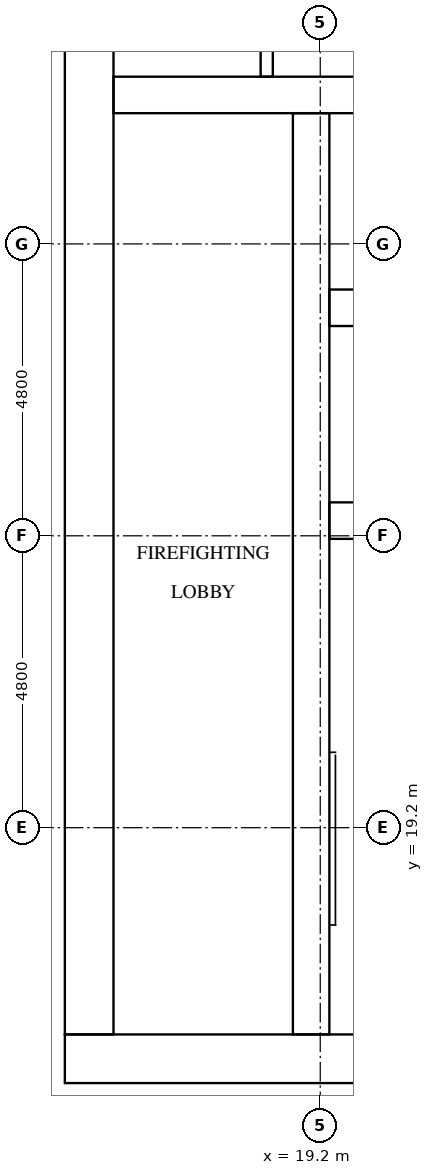
"""IFC4 building model, lengths in metres.
Left out: names, types, materials, properties, quantities, classifications, styles, units other than length and angle.
Written with IfcOpenShell. Run it as: python <this file> out.ifc"""

import sys

from ifc_helpers import new_model, si_unit, direction, frame, frame_2d, origin, place, context, subcontext, project, spatial, rectangle, extrude, element, fill, save


model = new_model("IFC4")
c1 = context("Model", 3, precision=1e-05, world=origin(), true_north=direction((0.0, 1.0)))
c2 = subcontext(c1, "Body", "Model", "MODEL_VIEW")
j1 = project(units=[si_unit("LENGTHUNIT", "METRE"), si_unit("PLANEANGLEUNIT", "RADIAN")], contexts=[c1])
p1 = place(None, origin())
s1 = spatial("IfcSite", under=j1, at=p1, CompositionType="ELEMENT")
p2 = place(p1, origin())
s2 = spatial("IfcBuilding", under=s1, at=p2, CompositionType="ELEMENT")
p3 = place(p2, frame((0.0, 0.0, 133.1)))
s3 = spatial("IfcBuildingStorey", under=s2, at=p3, CompositionType="ELEMENT", Elevation=133.1)
p4 = place(p3, frame((15.0, 15.4, 0.0), z_axis=(0.0, 0.0, 1.0), x_axis=(1.0, 0.0, 0.0)))
e1 = element("IfcWall", 1, at=p4, inside=s3, PredefinedType="SHEAR", context=c2, shape_type="SweptSolid", body=[
    extrude(rectangle(XDim=32.4, YDim=0.8, at=frame_2d((16.2, 0.0))), origin(), (0.0, 0.0, 1.0), 3.2),
])
p5 = place(p4, frame((15.3, 0.0, 0.0)))
e2 = element("IfcOpeningElement", 2, at=p5, cuts=e1, PredefinedType="OPENING", context=c2, shape_type="SweptSolid", body=[
    extrude(rectangle(XDim=1.8, YDim=2.1, at=frame_2d((0.9, 1.05))), frame((0.0, 0.41, 0.0), z_axis=(0.0, -1.0, 0.0), x_axis=(1.0, 0.0, 0.0)), (0.0, 0.0, 1.0), 0.82),
])
p6 = place(p3, frame((15.4, 15.8, 0.0), z_axis=(0.0, 0.0, 1.0), x_axis=(0.0, 1.0, 0.0)))
e3 = element("IfcWall", 3, at=p6, inside=s3, PredefinedType="SHEAR", context=c2, shape_type="SweptSolid", body=[
    extrude(rectangle(XDim=21.2, YDim=0.8, at=frame_2d((10.6, 0.0))), origin(), (0.0, 0.0, 1.0), 3.2),
])
p7 = place(p6, frame((4.96, 0.0, 0.0)))
e4 = element("IfcOpeningElement", 4, at=p7, cuts=e3, PredefinedType="OPENING", context=c2, shape_type="SweptSolid", body=[
    extrude(rectangle(XDim=1.2, YDim=2.1, at=frame_2d((0.6, 1.05))), frame((0.0, 0.41, 0.0), z_axis=(0.0, -1.0, 0.0), x_axis=(1.0, 0.0, 0.0)), (0.0, 0.0, 1.0), 0.82),
])
p8 = place(p3, frame((19.05, 15.8, 0.0), z_axis=(0.0, 0.0, 1.0), x_axis=(0.0, 1.0, 0.0)))
e5 = element("IfcWall", 5, at=p8, inside=s3, PredefinedType="SHEAR", context=c2, shape_type="SweptSolid", body=[
    extrude(rectangle(XDim=15.15, YDim=0.6, at=frame_2d((7.575, 0.0))), origin(), (0.0, 0.0, 1.0), 3.2),
])
p9 = place(p8, frame((9.65, 0.0, 0.0)))
e6 = element("IfcOpeningElement", 6, at=p9, cuts=e5, PredefinedType="OPENING", context=c2, shape_type="SweptSolid", body=[
    extrude(rectangle(XDim=1.1, YDim=2.1, at=frame_2d((0.55, 1.05))), frame((0.0, 0.31, 0.0), z_axis=(0.0, -1.0, 0.0), x_axis=(1.0, 0.0, 0.0)), (0.0, 0.0, 1.0), 0.62),
])
p10 = place(p8, frame((13.15, 0.0, 0.0)))
e7 = element("IfcOpeningElement", 7, at=p10, cuts=e5, PredefinedType="OPENING", context=c2, shape_type="SweptSolid", body=[
    extrude(rectangle(XDim=1.1, YDim=2.1, at=frame_2d((0.55, 1.05))), frame((0.0, 0.31, 0.0), z_axis=(0.0, -1.0, 0.0), x_axis=(1.0, 0.0, 0.0)), (0.0, 0.0, 1.0), 0.62),
])
p11 = place(p8, frame((0.4, 0.0, 0.0)))
e8 = element("IfcOpeningElement", 8, at=p11, cuts=e5, PredefinedType="OPENING", context=c2, shape_type="SweptSolid", body=[
    extrude(rectangle(XDim=1.2, YDim=2.1, at=frame_2d((0.6, 1.05))), frame((0.0, 0.31, 0.0), z_axis=(0.0, -1.0, 0.0), x_axis=(1.0, 0.0, 0.0)), (0.0, 0.0, 1.0), 0.62),
])
for number, where, z_axis, x_axis in (
    (9, (19.35, 24.25, 0.0), (0.0, 0.0, 1.0), (1.0, 0.0, 0.0)),
    (10, (19.35, 27.75, 0.0), (0.0, 0.0, 1.0), (1.0, 0.0, 0.0)),
):
    element("IfcWall", number, at=place(p3, frame(where, z_axis=z_axis, x_axis=x_axis)), inside=s3, PredefinedType="SHEAR", context=c2, shape_type="SweptSolid", body=[
        extrude(rectangle(XDim=3.45, YDim=0.6, at=frame_2d((1.725, 0.0))), origin(), (0.0, 0.0, 1.0), 3.2),
    ])
p12 = place(p3, frame((15.8, 31.25, 0.0), z_axis=(0.0, 0.0, 1.0), x_axis=(1.0, 0.0, 0.0)))
e11 = element("IfcWall", 11, at=p12, inside=s3, PredefinedType="SHEAR", context=c2, shape_type="SweptSolid", body=[
    extrude(rectangle(XDim=7.0, YDim=0.6, at=frame_2d((3.5, 0.0))), origin(), (0.0, 0.0, 1.0), 3.2),
])
p13 = place(p3, frame((18.32, 31.55, 0.0), z_axis=(0.0, 0.0, 1.0), x_axis=(0.0, 1.0, 0.0)))
e12 = element("IfcWall", 12, at=p13, inside=s3, PredefinedType="PARTITIONING", context=c2, shape_type="SweptSolid", body=[
    extrude(rectangle(XDim=5.45, YDim=0.2, at=frame_2d((2.725, 0.0))), origin(), (0.0, 0.0, 1.0), 3.2),
])
p14 = place(p9, origin())
e13 = element("IfcDoor", 13, at=p14, inside=s3, OperationType="DOUBLE_DOOR_SLIDING", PredefinedType="DOOR", context=c2, shape_type="SweptSolid", body=[
    extrude(rectangle(XDim=1.1, YDim=2.1, at=frame_2d((0.55, 1.05))), frame((0.0, 0.025, 0.0), z_axis=(0.0, -1.0, 0.0), x_axis=(1.0, 0.0, 0.0)), (0.0, 0.0, 1.0), 0.05),
])
fill(e6, e13)
p15 = place(p10, origin())
e14 = element("IfcDoor", 14, at=p15, inside=s3, OperationType="DOUBLE_DOOR_SLIDING", PredefinedType="DOOR", context=c2, shape_type="SweptSolid", body=[
    extrude(rectangle(XDim=1.1, YDim=2.1, at=frame_2d((0.55, 1.05))), frame((0.0, 0.025, 0.0), z_axis=(0.0, -1.0, 0.0), x_axis=(1.0, 0.0, 0.0)), (0.0, 0.0, 1.0), 0.05),
])
fill(e7, e14)
p16 = place(p11, frame((1.2, 0.0, 0.0), z_axis=(0.0, 0.0, 1.0), x_axis=(-1.0, 0.0, 0.0)))
e15 = element("IfcDoor", 15, at=p16, inside=s3, OperationType="SINGLE_SWING_RIGHT", PredefinedType="DOOR", context=c2, shape_type="SweptSolid", body=[
    extrude(rectangle(XDim=1.2, YDim=2.1, at=frame_2d((0.6, 1.05))), frame((0.0, 0.025, 0.0), z_axis=(0.0, -1.0, 0.0), x_axis=(1.0, 0.0, 0.0)), (0.0, 0.0, 1.0), 0.05),
])
fill(e8, e15)
p17 = place(p7, frame((1.2, 0.0, 0.0), z_axis=(0.0, 0.0, 1.0), x_axis=(-1.0, 0.0, 0.0)))
e16 = element("IfcDoor", 16, at=p17, inside=s3, OperationType="SINGLE_SWING_LEFT", PredefinedType="DOOR", context=c2, shape_type="SweptSolid", body=[
    extrude(rectangle(XDim=1.2, YDim=2.1, at=frame_2d((0.6, 1.05))), frame((0.0, 0.025, 0.0), z_axis=(0.0, -1.0, 0.0), x_axis=(1.0, 0.0, 0.0)), (0.0, 0.0, 1.0), 0.05),
])
fill(e4, e16)
save(model, sys.argv[1])
